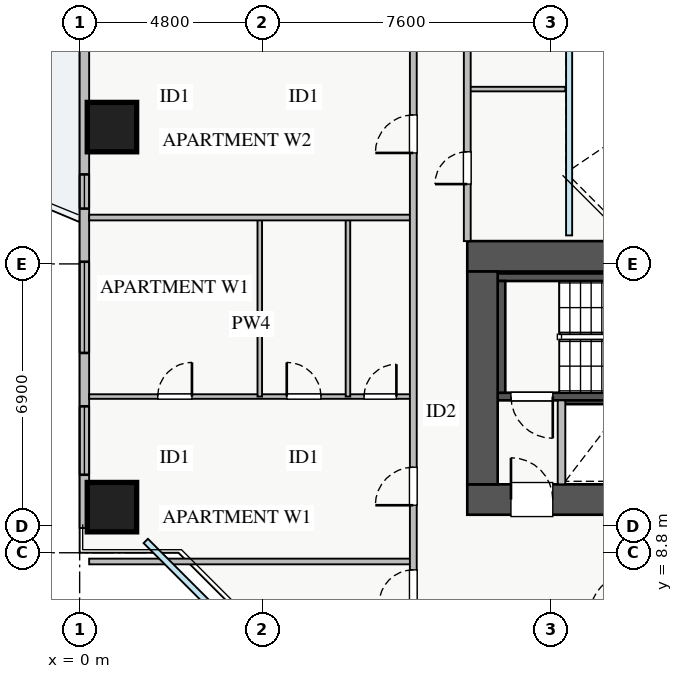
"""IFC4 building model, lengths in metres.
Left out: names, types, materials, properties, quantities, classifications, styles, units other than length and angle.
Written with IfcOpenShell. Run it as: python <this file> out.ifc"""

import sys

from ifc_helpers import new_model, si_unit, direction, frame, frame_2d, origin, origin_2d, place, context, subcontext, project, spatial, rectangle, extrude, source, transform, mapped, element, fill, save


model = new_model("IFC4")
c1 = context("Model", 3, precision=1e-05, world=origin(), true_north=direction((0.0, 1.0)))
c2 = subcontext(c1, "Body", "Model", "MODEL_VIEW")
j1 = project(units=[si_unit("LENGTHUNIT", "METRE"), si_unit("PLANEANGLEUNIT", "RADIAN")], contexts=[c1])
p1 = place(None, origin())
s1 = spatial("IfcSite", under=j1, at=p1, CompositionType="ELEMENT")
p2 = place(p1, origin())
s2 = spatial("IfcBuilding", under=s1, at=p2, CompositionType="ELEMENT")
p3 = place(p2, frame((0.0, 0.0, 76.25)))
s3 = spatial("IfcBuildingStorey", under=s2, at=p3, CompositionType="ELEMENT", Elevation=76.25)
p4 = place(p3, frame((12.68, 12.8, 0.0), z_axis=(0.0, 0.0, 1.0), x_axis=(1.0, 0.0, 0.0)))
e1 = element("IfcWall", 1, at=p4, inside=s3, PredefinedType="SHEAR", context=c2, shape_type="SweptSolid", body=[
    extrude(rectangle(XDim=1.94, YDim=0.18, at=frame_2d((0.97, 0.0))), origin(), (0.0, 0.0, 1.0), 3.07),
])
p5 = place(p3, frame((11.0, 12.91, 0.0), z_axis=(0.0, 0.0, 1.0), x_axis=(1.0, 0.0, 0.0)))
e2 = element("IfcWall", 2, at=p5, inside=s3, PredefinedType="SHEAR", context=c2, shape_type="SweptSolid", body=[
    extrude(rectangle(XDim=7.15, YDim=0.2, at=frame_2d((3.575, 0.0))), origin(), (0.0, 0.0, 1.0), 3.25),
])
p6 = place(p5, frame((0.35, 0.0, 0.0)))
e3 = element("IfcOpeningElement", 3, at=p6, cuts=e2, PredefinedType="OPENING", context=c2, shape_type="SweptSolid", body=[
    extrude(rectangle(XDim=1.1, YDim=2.05, at=frame_2d((0.55, 1.025))), frame((0.0, 0.11, 0.0), z_axis=(0.0, -1.0, 0.0), x_axis=(1.0, 0.0, 0.0)), (0.0, 0.0, 1.0), 0.22),
])
p7 = place(p3, frame((11.0, 16.05, 0.0), z_axis=(0.0, 0.0, 1.0), x_axis=(1.0, 0.0, 0.0)))
e4 = element("IfcWall", 4, at=p7, inside=s3, PredefinedType="SHEAR", context=c2, shape_type="SweptSolid", body=[
    extrude(rectangle(XDim=7.15, YDim=0.2, at=frame_2d((3.575, 0.0))), origin(), (0.0, 0.0, 1.0), 3.25),
])
p8 = place(p3, frame((11.1, 13.01, 0.0), z_axis=(0.0, 0.0, 1.0), x_axis=(0.0, 1.0, 0.0)))
e5 = element("IfcWall", 5, at=p8, inside=s3, PredefinedType="SHEAR", context=c2, shape_type="SweptSolid", body=[
    extrude(rectangle(XDim=2.94, YDim=0.2, at=frame_2d((1.47, 0.0))), origin(), (0.0, 0.0, 1.0), 3.25),
])
p9 = place(p3, frame((10.2, 10.2, 0.0), z_axis=(0.0, 0.0, 1.0), x_axis=(1.0, 0.0, 0.0)))
e6 = element("IfcWall", 6, at=p9, inside=s3, PredefinedType="SHEAR", context=c2, shape_type="SweptSolid", body=[
    extrude(rectangle(XDim=17.6, YDim=0.8, at=frame_2d((8.8, 0.0))), origin(), (0.0, 0.0, 1.0), 3.25),
])
p10 = place(p9, frame((1.15, 0.0, 0.0)))
e7 = element("IfcOpeningElement", 7, at=p10, cuts=e6, PredefinedType="OPENING", context=c2, shape_type="SweptSolid", body=[
    extrude(rectangle(XDim=1.1, YDim=2.05, at=frame_2d((0.55, 1.025))), frame((0.0, 0.41, 0.0), z_axis=(0.0, -1.0, 0.0), x_axis=(1.0, 0.0, 0.0)), (0.0, 0.0, 1.0), 0.82),
])
p11 = place(p9, frame((8.3, 0.0, 0.0)))
e8 = element("IfcOpeningElement", 8, at=p11, cuts=e6, PredefinedType="OPENING", context=c2, shape_type="SweptSolid", body=[
    extrude(rectangle(XDim=1.1, YDim=2.05, at=frame_2d((0.55, 1.025))), frame((0.0, 0.41, 0.0), z_axis=(0.0, -1.0, 0.0), x_axis=(1.0, 0.0, 0.0)), (0.0, 0.0, 1.0), 0.82),
])
p12 = place(p9, frame((10.05, 0.0, 0.0)))
e9 = element("IfcOpeningElement", 9, at=p12, cuts=e6, PredefinedType="OPENING", context=c2, shape_type="SweptSolid", body=[
    extrude(rectangle(XDim=1.1, YDim=2.05, at=frame_2d((0.55, 1.025))), frame((0.0, 0.41, 0.0), z_axis=(0.0, -1.0, 0.0), x_axis=(1.0, 0.0, 0.0)), (0.0, 0.0, 1.0), 0.82),
])
p13 = place(p9, frame((14.74, 0.0, 0.0)))
e10 = element("IfcOpeningElement", 10, at=p13, cuts=e6, PredefinedType="OPENING", context=c2, shape_type="SweptSolid", body=[
    extrude(rectangle(XDim=1.0, YDim=2.05, at=frame_2d((0.5, 1.025))), frame((0.0, 0.41, 0.0), z_axis=(0.0, -1.0, 0.0), x_axis=(1.0, 0.0, 0.0)), (0.0, 0.0, 1.0), 0.82),
])
p14 = place(p9, frame((11.945, 0.0, 0.0)))
e11 = element("IfcOpeningElement", 11, at=p14, cuts=e6, PredefinedType="OPENING", context=c2, shape_type="SweptSolid", body=[
    extrude(rectangle(XDim=1.0, YDim=2.05, at=frame_2d((0.5, 1.025))), frame((0.0, 0.41, 0.0), z_axis=(0.0, -1.0, 0.0), x_axis=(1.0, 0.0, 0.0)), (0.0, 0.0, 1.0), 0.82),
])
p15 = place(p9, frame((13.48, 0.0, 0.0)))
e12 = element("IfcOpeningElement", 12, at=p15, cuts=e6, PredefinedType="OPENING", context=c2, shape_type="SweptSolid", body=[
    extrude(rectangle(XDim=1.0, YDim=2.05, at=frame_2d((0.5, 1.025))), frame((0.0, 0.41, 0.0), z_axis=(0.0, -1.0, 0.0), x_axis=(1.0, 0.0, 0.0)), (0.0, 0.0, 1.0), 0.82),
])
p16 = place(p3, frame((10.2, 16.6, 0.0), z_axis=(0.0, 0.0, 1.0), x_axis=(1.0, 0.0, 0.0)))
e13 = element("IfcWall", 13, at=p16, inside=s3, PredefinedType="SHEAR", context=c2, shape_type="SweptSolid", body=[
    extrude(rectangle(XDim=17.6, YDim=0.8, at=frame_2d((8.8, 0.0))), origin(), (0.0, 0.0, 1.0), 3.25),
])
p17 = place(p3, frame((10.6, 10.6, 0.0), z_axis=(0.0, 0.0, 1.0), x_axis=(0.0, 1.0, 0.0)))
e14 = element("IfcWall", 14, at=p17, inside=s3, PredefinedType="SHEAR", context=c2, shape_type="SweptSolid", body=[
    extrude(rectangle(XDim=5.6, YDim=0.8, at=frame_2d((2.8, 0.0))), origin(), (0.0, 0.0, 1.0), 3.25),
])
m1 = source(origin(), c2, "Body", "SweptSolid", [
    extrude(rectangle(XDim=1.3, YDim=1.3, at=origin_2d()), origin(), (0.0, 0.0, 1.0), 3.25),
])
for number, where, z_axis, x_axis in (
    (15, (0.85, 20.0, 0.0), (0.0, 0.0, 1.0), (1.0, 0.0, 0.0)),
    (16, (0.85, 10.0, 0.0), (0.0, 0.0, 1.0), (1.0, 0.0, 0.0)),
):
    element("IfcColumn", number, at=place(p3, frame(where, z_axis=z_axis, x_axis=x_axis)), inside=s3, PredefinedType="COLUMN", context=c2, shape_type="MappedRepresentation", body=[
        mapped(m1, transform((0.0, 0.0, 0.0), x_axis=(1.0, 0.0, 0.0), y_axis=(0.0, 1.0, 0.0), z_axis=(0.0, 0.0, 1.0), scale=1.0)),
    ])
p18 = place(p3, frame((0.125, 9.45, 0.0), z_axis=(0.0, 0.0, 1.0), x_axis=(0.0, 1.0, 0.0)))
e17 = element("IfcWall", 17, at=p18, inside=s3, PredefinedType="STANDARD", context=c2, shape_type="SweptSolid", body=[
    extrude(rectangle(XDim=27.1, YDim=0.25, at=frame_2d((13.55, 0.0))), origin(), (0.0, 0.0, 1.0), 2.61),
])
p19 = place(p18, frame((14.4, 0.0, 0.0)))
e18 = element("IfcOpeningElement", 18, at=p19, cuts=e17, PredefinedType="OPENING", context=c2, shape_type="SweptSolid", body=[
    extrude(rectangle(XDim=1.2, YDim=2.1, at=frame_2d((0.6, 1.05))), frame((0.0, 0.135, 0.0), z_axis=(0.0, -1.0, 0.0), x_axis=(1.0, 0.0, 0.0)), (0.0, 0.0, 1.0), 0.27),
])
p20 = place(p18, frame((1.403, 0.0, 0.9)))
e19 = element("IfcOpeningElement", 19, at=p20, cuts=e17, PredefinedType="OPENING", context=c2, shape_type="SweptSolid", body=[
    extrude(rectangle(XDim=1.8, YDim=1.5, at=frame_2d((0.9, 0.75))), frame((0.0, 0.135, 0.0), z_axis=(0.0, -1.0, 0.0), x_axis=(1.0, 0.0, 0.0)), (0.0, 0.0, 1.0), 0.27),
])
p21 = place(p18, frame((22.663, 0.0, 0.9)))
e20 = element("IfcOpeningElement", 20, at=p21, cuts=e17, PredefinedType="OPENING", context=c2, shape_type="SweptSolid", body=[
    extrude(rectangle(XDim=2.1, YDim=1.48, at=frame_2d((1.05, 0.74))), frame((0.0, 0.135, 0.0), z_axis=(0.0, -1.0, 0.0), x_axis=(1.0, 0.0, 0.0)), (0.0, 0.0, 1.0), 0.27),
])
p22 = place(p18, frame((4.607, 0.0, 0.9)))
e21 = element("IfcOpeningElement", 21, at=p22, cuts=e17, PredefinedType="OPENING", context=c2, shape_type="SweptSolid", body=[
    extrude(rectangle(XDim=2.4, YDim=1.5, at=frame_2d((1.2, 0.75))), frame((0.0, 0.135, 0.0), z_axis=(0.0, -1.0, 0.0), x_axis=(1.0, 0.0, 0.0)), (0.0, 0.0, 1.0), 0.27),
])
p23 = place(p18, frame((13.17, 0.0, 0.9)))
e22 = element("IfcOpeningElement", 22, at=p23, cuts=e17, PredefinedType="OPENING", context=c2, shape_type="SweptSolid", body=[
    extrude(rectangle(XDim=0.9, YDim=1.2, at=frame_2d((0.45, 0.6))), frame((0.0, 0.135, 0.0), z_axis=(0.0, -1.0, 0.0), x_axis=(1.0, 0.0, 0.0)), (0.0, 0.0, 1.0), 0.27),
])
p24 = place(p18, frame((8.405, 0.0, 0.9)))
e23 = element("IfcOpeningElement", 23, at=p24, cuts=e17, PredefinedType="OPENING", context=c2, shape_type="SweptSolid", body=[
    extrude(rectangle(XDim=0.9, YDim=1.2, at=frame_2d((0.45, 0.6))), frame((0.0, 0.135, 0.0), z_axis=(0.0, -1.0, 0.0), x_axis=(1.0, 0.0, 0.0)), (0.0, 0.0, 1.0), 0.27),
])
p25 = place(p3, frame((12.68, 10.6, 0.0), z_axis=(0.0, 0.0, 1.0), x_axis=(0.0, 1.0, 0.0)))
e24 = element("IfcWall", 24, at=p25, inside=s3, PredefinedType="PARTITIONING", context=c2, shape_type="SweptSolid", body=[
    extrude(rectangle(XDim=2.21, YDim=0.2, at=frame_2d((1.105, 0.0))), origin(), (0.0, 0.0, 1.0), 3.07),
])
p26 = place(p3, frame((0.25, 8.57, 0.0), z_axis=(0.0, 0.0, 1.0), x_axis=(1.0, 0.0, 0.0)))
e25 = element("IfcWall", 25, at=p26, inside=s3, PredefinedType="PARTITIONING", context=c2, shape_type="SweptSolid", body=[
    extrude(rectangle(XDim=8.53, YDim=0.15, at=frame_2d((4.265, 0.0))), origin(), (0.0, 0.0, 1.0), 3.07),
])
p27 = place(p3, frame((0.25, 12.91, 0.0), z_axis=(0.0, 0.0, 1.0), x_axis=(1.0, 0.0, 0.0)))
e26 = element("IfcWall", 26, at=p27, inside=s3, PredefinedType="PLUMBINGWALL", context=c2, shape_type="SweptSolid", body=[
    extrude(rectangle(XDim=8.53, YDim=0.12, at=frame_2d((4.265, 0.0))), origin(), (0.0, 0.0, 1.0), 3.07),
])
p28 = place(p27, frame((1.805, 0.0, 0.0)))
e27 = element("IfcOpeningElement", 27, at=p28, cuts=e26, PredefinedType="OPENING", context=c2, shape_type="SweptSolid", body=[
    extrude(rectangle(XDim=0.9, YDim=2.05, at=frame_2d((0.45, 1.025))), frame((0.0, 0.07, 0.0), z_axis=(0.0, -1.0, 0.0), x_axis=(1.0, 0.0, 0.0)), (0.0, 0.0, 1.0), 0.14),
])
p29 = place(p27, frame((5.2, 0.0, 0.0)))
e28 = element("IfcOpeningElement", 28, at=p29, cuts=e26, PredefinedType="OPENING", context=c2, shape_type="SweptSolid", body=[
    extrude(rectangle(XDim=0.9, YDim=2.05, at=frame_2d((0.45, 1.025))), frame((0.0, 0.07, 0.0), z_axis=(0.0, -1.0, 0.0), x_axis=(1.0, 0.0, 0.0)), (0.0, 0.0, 1.0), 0.14),
])
p30 = place(p27, frame((7.235, 0.0, 0.0)))
e29 = element("IfcOpeningElement", 29, at=p30, cuts=e26, PredefinedType="OPENING", context=c2, shape_type="SweptSolid", body=[
    extrude(rectangle(XDim=0.85, YDim=2.05, at=frame_2d((0.425, 1.025))), frame((0.0, 0.07, 0.0), z_axis=(0.0, -1.0, 0.0), x_axis=(1.0, 0.0, 0.0)), (0.0, 0.0, 1.0), 0.14),
])
for number, where, z_axis, x_axis in (
    (30, (4.74, 12.91, 0.0), (0.0, 0.0, 1.0), (0.0, 1.0, 0.0)),
    (31, (7.06, 12.91, 0.0), (0.0, 0.0, 1.0), (0.0, 1.0, 0.0)),
):
    element("IfcWall", number, at=place(p3, frame(where, z_axis=z_axis, x_axis=x_axis)), inside=s3, PredefinedType="PLUMBINGWALL", context=c2, shape_type="SweptSolid", body=[
        extrude(rectangle(XDim=4.71, YDim=0.12, at=frame_2d((2.355, 0.0))), origin(), (0.0, 0.0, 1.0), 3.07),
    ])
p31 = place(p3, frame((0.25, 17.62, 0.0), z_axis=(0.0, 0.0, 1.0), x_axis=(1.0, 0.0, 0.0)))
e32 = element("IfcWall", 32, at=p31, inside=s3, PredefinedType="PARTITIONING", context=c2, shape_type="SweptSolid", body=[
    extrude(rectangle(XDim=8.53, YDim=0.15, at=frame_2d((4.265, 0.0))), origin(), (0.0, 0.0, 1.0), 3.07),
])
p32 = place(p3, frame((8.78, 7.21, 0.0), z_axis=(0.0, 0.0, 1.0), x_axis=(0.0, 1.0, 0.0)))
e33 = element("IfcWall", 33, at=p32, inside=s3, PredefinedType="PARTITIONING", context=c2, shape_type="SweptSolid", body=[
    extrude(rectangle(XDim=31.23, YDim=0.18, at=frame_2d((15.615, 0.0))), origin(), (0.0, 0.0, 1.0), 3.07),
])
p33 = place(p32, frame((30.09, 0.0, 0.0)))
e34 = element("IfcOpeningElement", 34, at=p33, cuts=e33, PredefinedType="OPENING", context=c2, shape_type="SweptSolid", body=[
    extrude(rectangle(XDim=0.9, YDim=2.05, at=frame_2d((0.45, 1.025))), frame((0.0, 0.1, 0.0), z_axis=(0.0, -1.0, 0.0), x_axis=(1.0, 0.0, 0.0)), (0.0, 0.0, 1.0), 0.2),
])
p34 = place(p32, frame((0.24, 0.0, 0.0)))
e35 = element("IfcOpeningElement", 35, at=p34, cuts=e33, PredefinedType="OPENING", context=c2, shape_type="SweptSolid", body=[
    extrude(rectangle(XDim=0.9, YDim=2.05, at=frame_2d((0.45, 1.025))), frame((0.0, 0.1, 0.0), z_axis=(0.0, -1.0, 0.0), x_axis=(1.0, 0.0, 0.0)), (0.0, 0.0, 1.0), 0.2),
])
p35 = place(p32, frame((2.84, 0.0, 0.0)))
e36 = element("IfcOpeningElement", 36, at=p35, cuts=e33, PredefinedType="OPENING", context=c2, shape_type="SweptSolid", body=[
    extrude(rectangle(XDim=1.0, YDim=2.05, at=frame_2d((0.5, 1.025))), frame((0.0, 0.1, 0.0), z_axis=(0.0, -1.0, 0.0), x_axis=(1.0, 0.0, 0.0)), (0.0, 0.0, 1.0), 0.2),
])
p36 = place(p32, frame((12.11, 0.0, 0.0)))
e37 = element("IfcOpeningElement", 37, at=p36, cuts=e33, PredefinedType="OPENING", context=c2, shape_type="SweptSolid", body=[
    extrude(rectangle(XDim=1.0, YDim=2.05, at=frame_2d((0.5, 1.025))), frame((0.0, 0.1, 0.0), z_axis=(0.0, -1.0, 0.0), x_axis=(1.0, 0.0, 0.0)), (0.0, 0.0, 1.0), 0.2),
])
p37 = place(p32, frame((24.62, 0.0, 0.0)))
e38 = element("IfcOpeningElement", 38, at=p37, cuts=e33, PredefinedType="OPENING", context=c2, shape_type="SweptSolid", body=[
    extrude(rectangle(XDim=1.0, YDim=2.05, at=frame_2d((0.5, 1.025))), frame((0.0, 0.1, 0.0), z_axis=(0.0, -1.0, 0.0), x_axis=(1.0, 0.0, 0.0)), (0.0, 0.0, 1.0), 0.2),
])
p38 = place(p3, frame((10.2, 21.0, 0.0), z_axis=(0.0, 0.0, 1.0), x_axis=(1.0, 0.0, 0.0)))
e39 = element("IfcWall", 39, at=p38, inside=s3, PredefinedType="PLUMBINGWALL", context=c2, shape_type="SweptSolid", body=[
    extrude(rectangle(XDim=2.58, YDim=0.12, at=frame_2d((1.29, 0.0))), origin(), (0.0, 0.0, 1.0), 3.07),
])
p39 = place(p3, frame((10.2, 17.0, 0.0), z_axis=(0.0, 0.0, 1.0), x_axis=(0.0, 1.0, 0.0)))
e40 = element("IfcWall", 40, at=p39, inside=s3, PredefinedType="PARTITIONING", context=c2, shape_type="SweptSolid", body=[
    extrude(rectangle(XDim=12.0, YDim=0.18, at=frame_2d((6.0, 0.0))), origin(), (0.0, 0.0, 1.0), 3.07),
])
p40 = place(p39, frame((1.5, 0.0, 0.0)))
e41 = element("IfcOpeningElement", 41, at=p40, cuts=e40, PredefinedType="OPENING", context=c2, shape_type="SweptSolid", body=[
    extrude(rectangle(XDim=0.85, YDim=2.05, at=frame_2d((0.425, 1.025))), frame((0.0, 0.1, 0.0), z_axis=(0.0, -1.0, 0.0), x_axis=(1.0, 0.0, 0.0)), (0.0, 0.0, 1.0), 0.2),
])
p41 = place(p39, frame((6.5, 0.0, 0.0)))
e42 = element("IfcOpeningElement", 42, at=p41, cuts=e40, PredefinedType="OPENING", context=c2, shape_type="SweptSolid", body=[
    extrude(rectangle(XDim=1.0, YDim=2.05, at=frame_2d((0.5, 1.025))), frame((0.0, 0.1, 0.0), z_axis=(0.0, -1.0, 0.0), x_axis=(1.0, 0.0, 0.0)), (0.0, 0.0, 1.0), 0.2),
])
m2 = source(origin(), c2, "Body", "SweptSolid", [
    extrude(rectangle(XDim=1.8, YDim=1.5, at=frame_2d((0.9, 0.75))), frame((0.0, 0.03, 0.0), z_axis=(0.0, -1.0, 0.0), x_axis=(1.0, 0.0, 0.0)), (0.0, 0.0, 1.0), 0.06),
])
p42 = place(p20, origin())
e43 = element("IfcWindow", 43, at=p42, inside=s3, PartitioningType="TRIPLE_PANEL_VERTICAL", PredefinedType="WINDOW", context=c2, shape_type="MappedRepresentation", body=[
    mapped(m2, transform((0.0, 0.0, 0.0), x_axis=(1.0, 0.0, 0.0), y_axis=(0.0, 1.0, 0.0), z_axis=(0.0, 0.0, 1.0), scale=1.0)),
])
fill(e19, e43)
m3 = source(origin(), c2, "Body", "SweptSolid", [
    extrude(rectangle(XDim=1.1, YDim=2.05, at=frame_2d((0.55, 1.025))), frame((0.0, 0.025, 0.0), z_axis=(0.0, -1.0, 0.0), x_axis=(1.0, 0.0, 0.0)), (0.0, 0.0, 1.0), 0.05),
])
p43 = place(p10, origin())
e44 = element("IfcDoor", 44, at=p43, inside=s3, OperationType="SINGLE_SWING_LEFT", PredefinedType="DOOR", context=c2, shape_type="MappedRepresentation", body=[
    mapped(m3, transform((0.0, 0.0, 0.0), x_axis=(1.0, 0.0, 0.0), y_axis=(0.0, 1.0, 0.0), z_axis=(0.0, 0.0, 1.0), scale=1.0)),
])
fill(e7, e44)
p44 = place(p6, frame((1.1, 0.0, 0.0), z_axis=(0.0, 0.0, 1.0), x_axis=(-1.0, 0.0, 0.0)))
e45 = element("IfcDoor", 45, at=p44, inside=s3, OperationType="SINGLE_SWING_RIGHT", PredefinedType="DOOR", context=c2, shape_type="MappedRepresentation", body=[
    mapped(m3, transform((0.0, 0.0, 0.0), x_axis=(1.0, 0.0, 0.0), y_axis=(0.0, 1.0, 0.0), z_axis=(0.0, 0.0, 1.0), scale=1.0)),
])
fill(e3, e45)
m4 = source(origin(), c2, "Body", "SweptSolid", [
    extrude(rectangle(XDim=0.9, YDim=2.05, at=frame_2d((0.45, 1.025))), frame((0.0, 0.025, 0.0), z_axis=(0.0, -1.0, 0.0), x_axis=(1.0, 0.0, 0.0)), (0.0, 0.0, 1.0), 0.05),
])
p45 = place(p28, origin())
e46 = element("IfcDoor", 46, at=p45, inside=s3, OperationType="SINGLE_SWING_RIGHT", PredefinedType="DOOR", context=c2, shape_type="MappedRepresentation", body=[
    mapped(m4, transform((0.0, 0.0, 0.0), x_axis=(1.0, 0.0, 0.0), y_axis=(0.0, 1.0, 0.0), z_axis=(0.0, 0.0, 1.0), scale=1.0)),
])
fill(e27, e46)
p46 = place(p29, origin())
e47 = element("IfcDoor", 47, at=p46, inside=s3, OperationType="SINGLE_SWING_LEFT", PredefinedType="DOOR", context=c2, shape_type="MappedRepresentation", body=[
    mapped(m4, transform((0.0, 0.0, 0.0), x_axis=(1.0, 0.0, 0.0), y_axis=(0.0, 1.0, 0.0), z_axis=(0.0, 0.0, 1.0), scale=1.0)),
])
fill(e28, e47)
m5 = source(origin(), c2, "Body", "SweptSolid", [
    extrude(rectangle(XDim=0.85, YDim=2.05, at=frame_2d((0.425, 1.025))), frame((0.0, 0.025, 0.0), z_axis=(0.0, -1.0, 0.0), x_axis=(1.0, 0.0, 0.0)), (0.0, 0.0, 1.0), 0.05),
])
p47 = place(p30, origin())
e48 = element("IfcDoor", 48, at=p47, inside=s3, OperationType="SINGLE_SWING_RIGHT", PredefinedType="DOOR", context=c2, shape_type="MappedRepresentation", body=[
    mapped(m5, transform((0.0, 0.0, 0.0), x_axis=(1.0, 0.0, 0.0), y_axis=(0.0, 1.0, 0.0), z_axis=(0.0, 0.0, 1.0), scale=1.0)),
])
fill(e29, e48)
p48 = place(p34, origin())
e49 = element("IfcDoor", 49, at=p48, inside=s3, OperationType="SINGLE_SWING_LEFT", PredefinedType="DOOR", context=c2, shape_type="MappedRepresentation", body=[
    mapped(m4, transform((0.0, 0.0, 0.0), x_axis=(1.0, 0.0, 0.0), y_axis=(0.0, 1.0, 0.0), z_axis=(0.0, 0.0, 1.0), scale=1.0)),
])
fill(e35, e49)
m6 = source(origin(), c2, "Body", "SweptSolid", [
    extrude(rectangle(XDim=1.0, YDim=2.05, at=frame_2d((0.5, 1.025))), frame((0.0, 0.025, 0.0), z_axis=(0.0, -1.0, 0.0), x_axis=(1.0, 0.0, 0.0)), (0.0, 0.0, 1.0), 0.05),
])
p49 = place(p35, origin())
e50 = element("IfcDoor", 50, at=p49, inside=s3, OperationType="SINGLE_SWING_LEFT", PredefinedType="DOOR", context=c2, shape_type="MappedRepresentation", body=[
    mapped(m6, transform((0.0, 0.0, 0.0), x_axis=(1.0, 0.0, 0.0), y_axis=(0.0, 1.0, 0.0), z_axis=(0.0, 0.0, 1.0), scale=1.0)),
])
fill(e36, e50)
p50 = place(p36, origin())
e51 = element("IfcDoor", 51, at=p50, inside=s3, OperationType="SINGLE_SWING_LEFT", PredefinedType="DOOR", context=c2, shape_type="MappedRepresentation", body=[
    mapped(m6, transform((0.0, 0.0, 0.0), x_axis=(1.0, 0.0, 0.0), y_axis=(0.0, 1.0, 0.0), z_axis=(0.0, 0.0, 1.0), scale=1.0)),
])
fill(e37, e51)
p51 = place(p40, origin())
e52 = element("IfcDoor", 52, at=p51, inside=s3, OperationType="SINGLE_SWING_LEFT", PredefinedType="DOOR", context=c2, shape_type="MappedRepresentation", body=[
    mapped(m5, transform((0.0, 0.0, 0.0), x_axis=(1.0, 0.0, 0.0), y_axis=(0.0, 1.0, 0.0), z_axis=(0.0, 0.0, 1.0), scale=1.0)),
])
fill(e41, e52)
m7 = source(origin(), c2, "Body", "SweptSolid", [
    extrude(rectangle(XDim=2.4, YDim=1.5, at=frame_2d((1.2, 0.75))), frame((0.0, 0.03, 0.0), z_axis=(0.0, -1.0, 0.0), x_axis=(1.0, 0.0, 0.0)), (0.0, 0.0, 1.0), 0.06),
])
p52 = place(p22, origin())
e53 = element("IfcWindow", 53, at=p52, inside=s3, PartitioningType="TRIPLE_PANEL_VERTICAL", PredefinedType="WINDOW", context=c2, shape_type="MappedRepresentation", body=[
    mapped(m7, transform((0.0, 0.0, 0.0), x_axis=(1.0, 0.0, 0.0), y_axis=(0.0, 1.0, 0.0), z_axis=(0.0, 0.0, 1.0), scale=1.0)),
])
fill(e21, e53)
m8 = source(origin(), c2, "Body", "SweptSolid", [
    extrude(rectangle(XDim=0.9, YDim=1.2, at=frame_2d((0.45, 0.6))), frame((0.0, 0.03, 0.0), z_axis=(0.0, -1.0, 0.0), x_axis=(1.0, 0.0, 0.0)), (0.0, 0.0, 1.0), 0.06),
])
p53 = place(p24, origin())
e54 = element("IfcWindow", 54, at=p53, inside=s3, PartitioningType="SINGLE_PANEL", PredefinedType="WINDOW", context=c2, shape_type="MappedRepresentation", body=[
    mapped(m8, transform((0.0, 0.0, 0.0), x_axis=(1.0, 0.0, 0.0), y_axis=(0.0, 1.0, 0.0), z_axis=(0.0, 0.0, 1.0), scale=1.0)),
])
fill(e23, e54)
save(model, sys.argv[1])
